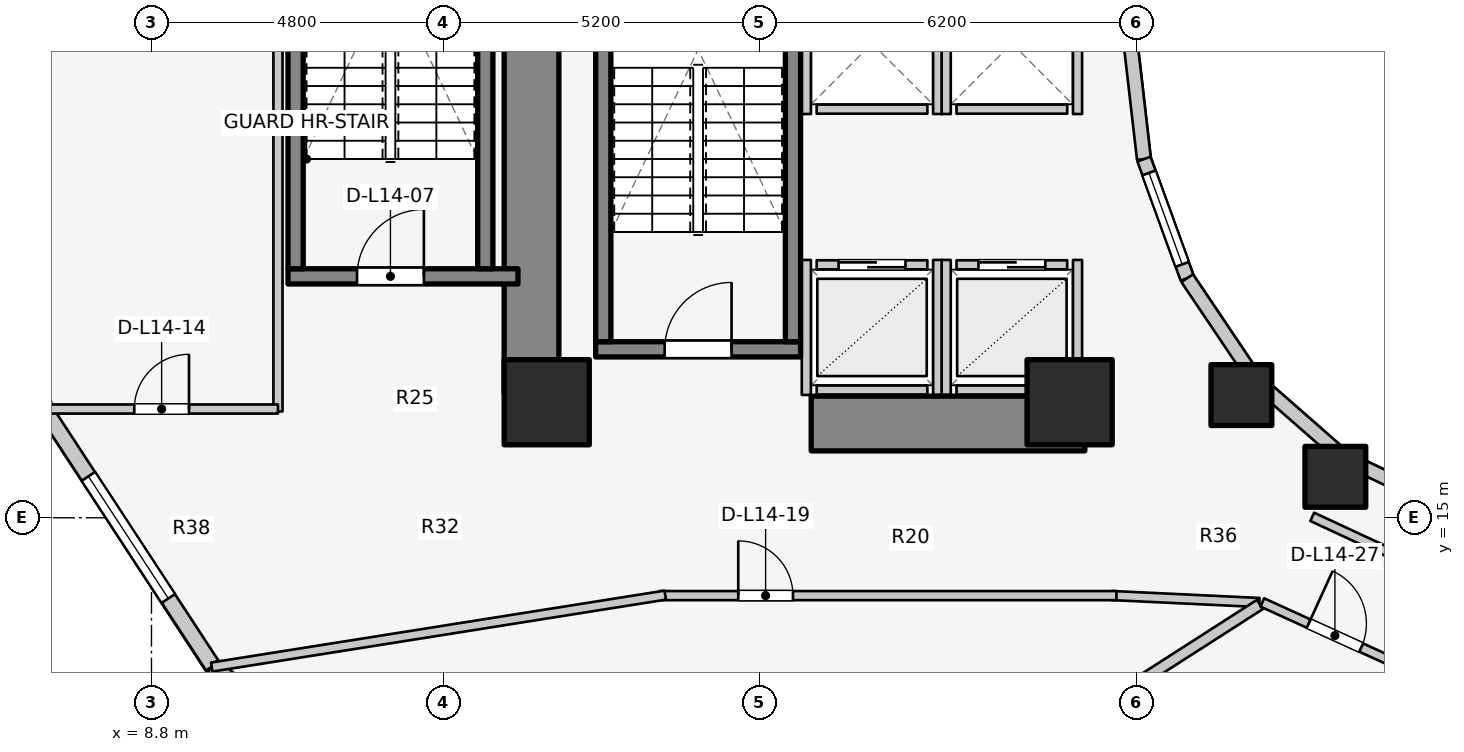
"""IFC4 building model, lengths in metres.
Left out: names, types, materials, properties, quantities, classifications, styles, units other than length and angle.
Written with IfcOpenShell. Run it as: python <this file> out.ifc"""

import sys

from ifc_helpers import new_model, si_unit, direction, frame, frame_2d, origin, origin_2d, place, context, subcontext, project, spatial, rectangle, extrude, element, fill, save


model = new_model("IFC4")
c1 = context("Model", 3, precision=1e-05, world=origin(), true_north=direction((0.0, 1.0)))
c2 = subcontext(c1, "Body", "Model", "MODEL_VIEW")
j1 = project(units=[si_unit("LENGTHUNIT", "METRE"), si_unit("PLANEANGLEUNIT", "RADIAN")], contexts=[c1])
p1 = place(None, origin())
s1 = spatial("IfcSite", under=j1, at=p1, CompositionType="ELEMENT")
p2 = place(p1, origin())
s2 = spatial("IfcBuilding", under=s1, at=p2, CompositionType="ELEMENT")
p3 = place(p2, frame((0.0, 0.0, 49.3)))
s3 = spatial("IfcBuildingStorey", under=s2, at=p3, CompositionType="ELEMENT", Elevation=49.3)
p4 = place(p3, frame((15.05, 17.05, 0.0), z_axis=(0.0, 0.0, 1.0), x_axis=(0.0, 1.0, 0.0)))
e1 = element("IfcWall", 1, at=p4, inside=s3, PredefinedType="SHEAR", context=c2, shape_type="SweptSolid", body=[
    extrude(rectangle(XDim=12.8, YDim=0.9, at=frame_2d((6.4, 0.0))), origin(), (0.0, 0.0, 1.0), 3.1),
])
p5 = place(p3, frame((19.65, 16.55, 0.0), z_axis=(0.0, 0.0, 1.0), x_axis=(1.0, 0.0, 0.0)))
e2 = element("IfcWall", 2, at=p5, inside=s3, PredefinedType="SHEAR", context=c2, shape_type="SweptSolid", body=[
    extrude(rectangle(XDim=4.5, YDim=0.9, at=frame_2d((2.25, 0.0))), origin(), (0.0, 0.0, 1.0), 3.1),
])
p6 = place(p3, frame((16.105, 17.77, 0.0), z_axis=(0.0, 0.0, 1.0), x_axis=(1.0, 0.0, 0.0)))
e3 = element("IfcWall", 3, at=p6, inside=s3, PredefinedType="SOLIDWALL", context=c2, shape_type="SweptSolid", body=[
    extrude(rectangle(XDim=3.37, YDim=0.25, at=frame_2d((1.685, 0.0))), origin(), (0.0, 0.0, 1.0), 3.1),
])
p7 = place(p6, frame((1.135, 0.0, 0.0)))
e4 = element("IfcOpeningElement", 4, at=p7, cuts=e3, PredefinedType="OPENING", context=c2, shape_type="SweptSolid", body=[
    extrude(rectangle(XDim=1.1, YDim=2.1, at=frame_2d((0.55, 1.05))), frame((0.0, 0.135, 0.0), z_axis=(0.0, -1.0, 0.0), x_axis=(1.0, 0.0, 0.0)), (0.0, 0.0, 1.0), 0.27),
])
for number, where, z_axis, x_axis in (
    (5, (16.23, 17.895, 0.0), (0.0, 0.0, 1.0), (0.0, 1.0, 0.0)),
    (6, (19.35, 17.895, 0.0), (0.0, 0.0, 1.0), (0.0, 1.0, 0.0)),
):
    element("IfcWall", number, at=place(p3, frame(where, z_axis=z_axis, x_axis=x_axis)), inside=s3, PredefinedType="SOLIDWALL", context=c2, shape_type="SweptSolid", body=[
        extrude(rectangle(XDim=7.81, YDim=0.25, at=frame_2d((3.905, 0.0))), origin(), (0.0, 0.0, 1.0), 3.1),
    ])
p8 = place(p3, frame((11.045, 18.97, 0.0), z_axis=(0.0, 0.0, 1.0), x_axis=(1.0, 0.0, 0.0)))
e7 = element("IfcWall", 7, at=p8, inside=s3, PredefinedType="SOLIDWALL", context=c2, shape_type="SweptSolid", body=[
    extrude(rectangle(XDim=3.782, YDim=0.25, at=frame_2d((1.891, 0.0))), origin(), (0.0, 0.0, 1.0), 3.1),
])
p9 = place(p8, frame((1.135, 0.0, 0.0)))
e8 = element("IfcOpeningElement", 8, at=p9, cuts=e7, PredefinedType="OPENING", context=c2, shape_type="SweptSolid", body=[
    extrude(rectangle(XDim=1.1, YDim=2.1, at=frame_2d((0.55, 1.05))), frame((0.0, 0.135, 0.0), z_axis=(0.0, -1.0, 0.0), x_axis=(1.0, 0.0, 0.0)), (0.0, 0.0, 1.0), 0.27),
])
for number, where, z_axis, x_axis in (
    (9, (11.17, 19.095, 0.0), (0.0, 0.0, 1.0), (0.0, 1.0, 0.0)),
    (10, (14.29, 19.095, 0.0), (0.0, 0.0, 1.0), (0.0, 1.0, 0.0)),
):
    element("IfcWall", number, at=place(p3, frame(where, z_axis=z_axis, x_axis=x_axis)), inside=s3, PredefinedType="SOLIDWALL", context=c2, shape_type="SweptSolid", body=[
        extrude(rectangle(XDim=7.81, YDim=0.25, at=frame_2d((3.905, 0.0))), origin(), (0.0, 0.0, 1.0), 3.1),
    ])
for number, where, z_axis, x_axis in (
    (11, (15.3, 16.9, 0.0), (0.0, 0.0, 1.0), (1.0, 0.0, 0.0)),
    (12, (23.9, 16.9, 0.0), (0.0, 0.0, 1.0), (1.0, 0.0, 0.0)),
):
    element("IfcColumn", number, at=place(p3, frame(where, z_axis=z_axis, x_axis=x_axis)), inside=s3, PredefinedType="COLUMN", context=c2, shape_type="SweptSolid", body=[
        extrude(rectangle(XDim=1.4, YDim=1.4, at=origin_2d()), origin(), (0.0, 0.0, 1.0), 3.1),
    ])
for number, where, z_axis, x_axis in (
    (13, (26.725, 17.018, 0.0), (0.0, 0.0, 1.0), (1.0, 0.0, 0.0)),
    (14, (28.27, 15.673, 0.0), (0.0, 0.0, 1.0), (1.0, 0.0, 0.0)),
):
    element("IfcColumn", number, at=place(p3, frame(where, z_axis=z_axis, x_axis=x_axis)), inside=s3, PredefinedType="COLUMN", context=c2, shape_type="SweptSolid", body=[
        extrude(rectangle(XDim=1.0, YDim=1.0, at=origin_2d()), origin(), (0.0, 0.0, 1.0), 3.1),
    ])
p10 = place(p3, frame((24.88, 23.0, 0.0), z_axis=(0.0, 0.0, 1.0), x_axis=(0.114711713601, -0.993398823617, 0.0)))
e15 = element("IfcWall", 15, at=p10, inside=s3, PredefinedType="STANDARD", context=c2, shape_type="SweptSolid", body=[
    extrude(rectangle(XDim=2.115, YDim=0.23, at=frame_2d((1.058, 0.0))), origin(), (0.0, 0.0, 1.0), 2.84),
])
p11 = place(p3, frame((25.123, 20.898, 0.0), z_axis=(0.0, 0.0, 1.0), x_axis=(0.341423187295, -0.93990968033, 0.0)))
e16 = element("IfcWall", 16, at=p11, inside=s3, PredefinedType="STANDARD", context=c2, shape_type="SweptSolid", body=[
    extrude(rectangle(XDim=2.084, YDim=0.23, at=frame_2d((1.042, 0.0))), origin(), (0.0, 0.0, 1.0), 2.84),
])
p12 = place(p11, frame((0.242, 0.0, 0.85)))
e17 = element("IfcOpeningElement", 17, at=p12, cuts=e16, PredefinedType="OPENING", context=c2, shape_type="SweptSolid", body=[
    extrude(rectangle(XDim=1.6, YDim=1.65, at=frame_2d((0.8, 0.825))), frame((0.0, 0.125, 0.0), z_axis=(0.0, -1.0, 0.0), x_axis=(1.0, 0.0, 0.0)), (0.0, 0.0, 1.0), 0.25),
])
p13 = place(p3, frame((25.834, 18.94, 0.0), z_axis=(0.0, 0.0, 1.0), x_axis=(0.558197800898, -0.829707909492, 0.0)))
e18 = element("IfcWall", 18, at=p13, inside=s3, PredefinedType="STANDARD", context=c2, shape_type="SweptSolid", body=[
    extrude(rectangle(XDim=2.027, YDim=0.23, at=frame_2d((1.013, 0.0))), origin(), (0.0, 0.0, 1.0), 2.16),
])
p14 = place(p3, frame((26.965, 17.258, 0.0), z_axis=(0.0, 0.0, 1.0), x_axis=(0.752576694707, -0.658504607869, 0.0)))
e19 = element("IfcWall", 19, at=p14, inside=s3, PredefinedType="STANDARD", context=c2, shape_type="SweptSolid", body=[
    extrude(rectangle(XDim=1.959, YDim=0.23, at=frame_2d((0.98, 0.0))), origin(), (0.0, 0.0, 1.0), 2.16),
])
p15 = place(p3, frame((28.44, 15.968, 0.0), z_axis=(0.0, 0.0, 1.0), x_axis=(0.904179699603, -0.427152280606, 0.0)))
e20 = element("IfcWall", 20, at=p15, inside=s3, PredefinedType="STANDARD", context=c2, shape_type="SweptSolid", body=[
    extrude(rectangle(XDim=1.899, YDim=0.23, at=frame_2d((0.95, 0.0))), origin(), (0.0, 0.0, 1.0), 2.16),
])
p16 = place(p3, frame((7.033, 16.795, 0.0), z_axis=(0.0, 0.0, 1.0), x_axis=(0.547702757047, -0.836672988642, 0.0)))
e21 = element("IfcWall", 21, at=p16, inside=s3, PredefinedType="STANDARD", context=c2, shape_type="SweptSolid", body=[
    extrude(rectangle(XDim=5.062, YDim=0.26, at=frame_2d((2.531, 0.0))), origin(), (0.0, 0.0, 1.0), 2.85),
])
p17 = place(p16, frame((1.331, 0.0, 0.75)))
e22 = element("IfcOpeningElement", 22, at=p17, cuts=e21, PredefinedType="OPENING", context=c2, shape_type="SweptSolid", body=[
    extrude(rectangle(XDim=2.4, YDim=1.7, at=frame_2d((1.2, 0.85))), frame((0.0, 0.14, 0.0), z_axis=(0.0, -1.0, 0.0), x_axis=(1.0, 0.0, 0.0)), (0.0, 0.0, 1.0), 0.28),
])
p18 = place(p3, frame((9.806, 12.559, 0.0), z_axis=(0.0, 0.0, 1.0), x_axis=(0.783123133379, -0.621866672179, 0.0)))
e23 = element("IfcWall", 23, at=p18, inside=s3, PredefinedType="STANDARD", context=c2, shape_type="SweptSolid", body=[
    extrude(rectangle(XDim=4.839, YDim=0.26, at=frame_2d((2.419, 0.0))), origin(), (0.0, 0.0, 1.0), 2.85),
])
p19 = place(p18, frame((1.669, 0.0, 0.75)))
e24 = element("IfcOpeningElement", 24, at=p19, cuts=e23, PredefinedType="OPENING", context=c2, shape_type="SweptSolid", body=[
    extrude(rectangle(XDim=1.5, YDim=1.6, at=frame_2d((0.75, 0.8))), frame((0.0, 0.14, 0.0), z_axis=(0.0, -1.0, 0.0), x_axis=(1.0, 0.0, 0.0)), (0.0, 0.0, 1.0), 0.28),
])
p20 = place(p3, frame((19.74, 19.16, 0.0), z_axis=(0.0, 0.0, 1.0), x_axis=(1.0, 0.0, 0.0)))
e25 = element("IfcWall", 25, at=p20, inside=s3, PredefinedType="SOLIDWALL", context=c2, shape_type="SweptSolid", body=[
    extrude(rectangle(XDim=1.82, YDim=0.15, at=frame_2d((0.91, 0.0))), origin(), (0.0, 0.0, 1.0), 2.855),
])
p21 = place(p20, frame((0.36, 0.0, 0.0)))
e26 = element("IfcOpeningElement", 26, at=p21, cuts=e25, PredefinedType="OPENING", context=c2, shape_type="SweptSolid", body=[
    extrude(rectangle(XDim=1.1, YDim=2.1, at=frame_2d((0.55, 1.05))), frame((0.0, 0.085, 0.0), z_axis=(0.0, -1.0, 0.0), x_axis=(1.0, 0.0, 0.0)), (0.0, 0.0, 1.0), 0.17),
])
p22 = place(p3, frame((19.74, 17.1, 0.0), z_axis=(0.0, 0.0, 1.0), x_axis=(1.0, 0.0, 0.0)))
e27 = element("IfcWall", 27, at=p22, inside=s3, PredefinedType="SOLIDWALL", context=c2, shape_type="SweptSolid", body=[
    extrude(rectangle(XDim=1.82, YDim=0.15, at=frame_2d((0.91, 0.0))), origin(), (0.0, 0.0, 1.0), 2.855),
])
p23 = place(p3, frame((19.57, 17.02, 0.0), z_axis=(0.0, 0.0, 1.0), x_axis=(0.0, 1.0, 0.0)))
e28 = element("IfcWall", 28, at=p23, inside=s3, PredefinedType="SOLIDWALL", context=c2, shape_type="SweptSolid", body=[
    extrude(rectangle(XDim=2.22, YDim=0.15, at=frame_2d((1.11, 0.0))), origin(), (0.0, 0.0, 1.0), 2.12),
])
p24 = place(p3, frame((21.73, 17.02, 0.0), z_axis=(0.0, 0.0, 1.0), x_axis=(0.0, 1.0, 0.0)))
e29 = element("IfcWall", 29, at=p24, inside=s3, PredefinedType="SOLIDWALL", context=c2, shape_type="SweptSolid", body=[
    extrude(rectangle(XDim=2.22, YDim=0.15, at=frame_2d((1.11, 0.0))), origin(), (0.0, 0.0, 1.0), 2.855),
])
p25 = place(p3, frame((22.04, 19.16, 0.0), z_axis=(0.0, 0.0, 1.0), x_axis=(1.0, 0.0, 0.0)))
e30 = element("IfcWall", 30, at=p25, inside=s3, PredefinedType="SOLIDWALL", context=c2, shape_type="SweptSolid", body=[
    extrude(rectangle(XDim=1.82, YDim=0.15, at=frame_2d((0.91, 0.0))), origin(), (0.0, 0.0, 1.0), 2.12),
])
p26 = place(p25, frame((0.36, 0.0, 0.0)))
e31 = element("IfcOpeningElement", 31, at=p26, cuts=e30, PredefinedType="OPENING", context=c2, shape_type="SweptSolid", body=[
    extrude(rectangle(XDim=1.1, YDim=2.1, at=frame_2d((0.55, 1.05))), frame((0.0, 0.085, 0.0), z_axis=(0.0, -1.0, 0.0), x_axis=(1.0, 0.0, 0.0)), (0.0, 0.0, 1.0), 0.17),
])
p27 = place(p3, frame((22.04, 17.1, 0.0), z_axis=(0.0, 0.0, 1.0), x_axis=(1.0, 0.0, 0.0)))
e32 = element("IfcWall", 32, at=p27, inside=s3, PredefinedType="SOLIDWALL", context=c2, shape_type="SweptSolid", body=[
    extrude(rectangle(XDim=1.82, YDim=0.15, at=frame_2d((0.91, 0.0))), origin(), (0.0, 0.0, 1.0), 2.12),
])
p28 = place(p3, frame((21.87, 17.02, 0.0), z_axis=(0.0, 0.0, 1.0), x_axis=(0.0, 1.0, 0.0)))
e33 = element("IfcWall", 33, at=p28, inside=s3, PredefinedType="SOLIDWALL", context=c2, shape_type="SweptSolid", body=[
    extrude(rectangle(XDim=2.22, YDim=0.15, at=frame_2d((1.11, 0.0))), origin(), (0.0, 0.0, 1.0), 2.855),
])
p29 = place(p3, frame((24.03, 17.02, 0.0), z_axis=(0.0, 0.0, 1.0), x_axis=(0.0, 1.0, 0.0)))
e34 = element("IfcWall", 34, at=p29, inside=s3, PredefinedType="SOLIDWALL", context=c2, shape_type="SweptSolid", body=[
    extrude(rectangle(XDim=2.22, YDim=0.15, at=frame_2d((1.11, 0.0))), origin(), (0.0, 0.0, 1.0), 2.12),
])
p30 = place(p3, frame((19.74, 21.72, 0.0), z_axis=(0.0, 0.0, 1.0), x_axis=(1.0, 0.0, 0.0)))
e35 = element("IfcWall", 35, at=p30, inside=s3, PredefinedType="SOLIDWALL", context=c2, shape_type="SweptSolid", body=[
    extrude(rectangle(XDim=1.82, YDim=0.15, at=frame_2d((0.91, 0.0))), origin(), (0.0, 0.0, 1.0), 2.855),
])
for number, where, z_axis, x_axis in (
    (36, (19.57, 21.64, 0.0), (0.0, 0.0, 1.0), (0.0, 1.0, 0.0)),
    (37, (21.73, 21.64, 0.0), (0.0, 0.0, 1.0), (0.0, 1.0, 0.0)),
):
    element("IfcWall", number, at=place(p3, frame(where, z_axis=z_axis, x_axis=x_axis)), inside=s3, PredefinedType="SOLIDWALL", context=c2, shape_type="SweptSolid", body=[
        extrude(rectangle(XDim=2.32, YDim=0.15, at=frame_2d((1.16, 0.0))), origin(), (0.0, 0.0, 1.0), 2.855),
    ])
p31 = place(p3, frame((22.04, 21.72, 0.0), z_axis=(0.0, 0.0, 1.0), x_axis=(1.0, 0.0, 0.0)))
e38 = element("IfcWall", 38, at=p31, inside=s3, PredefinedType="SOLIDWALL", context=c2, shape_type="SweptSolid", body=[
    extrude(rectangle(XDim=1.82, YDim=0.15, at=frame_2d((0.91, 0.0))), origin(), (0.0, 0.0, 1.0), 2.12),
])
p32 = place(p3, frame((21.87, 21.64, 0.0), z_axis=(0.0, 0.0, 1.0), x_axis=(0.0, 1.0, 0.0)))
e39 = element("IfcWall", 39, at=p32, inside=s3, PredefinedType="SOLIDWALL", context=c2, shape_type="SweptSolid", body=[
    extrude(rectangle(XDim=2.32, YDim=0.15, at=frame_2d((1.16, 0.0))), origin(), (0.0, 0.0, 1.0), 2.855),
])
p33 = place(p3, frame((24.03, 21.64, 0.0), z_axis=(0.0, 0.0, 1.0), x_axis=(0.0, 1.0, 0.0)))
e40 = element("IfcWall", 40, at=p33, inside=s3, PredefinedType="SOLIDWALL", context=c2, shape_type="SweptSolid", body=[
    extrude(rectangle(XDim=2.32, YDim=0.15, at=frame_2d((1.16, 0.0))), origin(), (0.0, 0.0, 1.0), 2.12),
])
p34 = place(p3, frame((27.89, 15.015, 0.0), z_axis=(0.0, 0.0, 1.0), x_axis=(0.906943449489, -0.421252393975, 0.0)))
e41 = element("IfcWall", 41, at=p34, inside=s3, PredefinedType="PARTITIONING", context=c2, shape_type="SweptSolid", body=[
    extrude(rectangle(XDim=2.186, YDim=0.15, at=frame_2d((1.093, 0.0))), origin(), (0.0, 0.0, 1.0), 2.237),
])
p35 = place(p3, frame((10.88, 16.748, 0.0), z_axis=(0.0, 0.0, 1.0), x_axis=(0.0, 1.0, 0.0)))
e42 = element("IfcWall", 42, at=p35, inside=s3, PredefinedType="PARTITIONING", context=c2, shape_type="SweptSolid", body=[
    extrude(rectangle(XDim=12.503, YDim=0.15, at=frame_2d((6.252, 0.0))), origin(), (0.0, 0.0, 1.0), 2.12),
])
p36 = place(p3, frame((7.014, 16.788, 0.0), z_axis=(0.0, 0.0, 1.0), x_axis=(1.0, 0.0, 0.0)))
e43 = element("IfcWall", 43, at=p36, inside=s3, PredefinedType="PARTITIONING", context=c2, shape_type="SweptSolid", body=[
    extrude(rectangle(XDim=3.866, YDim=0.15, at=frame_2d((1.933, 0.0))), origin(), (0.0, 0.0, 1.0), 2.855),
])
p37 = place(p36, frame((1.503, 0.0, 0.0)))
e44 = element("IfcOpeningElement", 44, at=p37, cuts=e43, PredefinedType="OPENING", context=c2, shape_type="SweptSolid", body=[
    extrude(rectangle(XDim=0.9, YDim=2.1, at=frame_2d((0.45, 1.05))), frame((0.0, 0.085, 0.0), z_axis=(0.0, -1.0, 0.0), x_axis=(1.0, 0.0, 0.0)), (0.0, 0.0, 1.0), 0.17),
])
p38 = place(p3, frame((27.02, 13.606, 0.0), z_axis=(0.0, 0.0, 1.0), x_axis=(-0.998877427952, 0.047369651964, 0.0)))
e45 = element("IfcWall", 45, at=p38, inside=s3, PredefinedType="PARTITIONING", context=c2, shape_type="SweptSolid", body=[
    extrude(rectangle(XDim=2.433, YDim=0.15, at=frame_2d((1.216, 0.0))), origin(), (0.0, 0.0, 1.0), 2.237),
])
p39 = place(p3, frame((17.15, 13.72, 0.0), z_axis=(0.0, 0.0, 1.0), x_axis=(1.0, 0.0, 0.0)))
e46 = element("IfcWall", 46, at=p39, inside=s3, PredefinedType="PARTITIONING", context=c2, shape_type="SweptSolid", body=[
    extrude(rectangle(XDim=7.52, YDim=0.15, at=frame_2d((3.76, 0.0))), origin(), (0.0, 0.0, 1.0), 2.237),
])
p40 = place(p39, frame((1.3, 0.0, 0.0)))
e47 = element("IfcOpeningElement", 47, at=p40, cuts=e46, PredefinedType="OPENING", context=c2, shape_type="SweptSolid", body=[
    extrude(rectangle(XDim=0.9, YDim=2.1, at=frame_2d((0.45, 1.05))), frame((0.0, 0.085, 0.0), z_axis=(0.0, -1.0, 0.0), x_axis=(1.0, 0.0, 0.0)), (0.0, 0.0, 1.0), 0.17),
])
p41 = place(p3, frame((17.25, 13.728, 0.0), z_axis=(0.0, 0.0, 1.0), x_axis=(-0.987655781226, -0.156639898525, 0.0)))
e48 = element("IfcWall", 48, at=p41, inside=s3, PredefinedType="PARTITIONING", context=c2, shape_type="SweptSolid", body=[
    extrude(rectangle(XDim=7.552, YDim=0.15, at=frame_2d((3.776, 0.0))), origin(), (0.0, 0.0, 1.0), 2.069),
])
p42 = place(p3, frame((27.029, 13.574, 0.0), z_axis=(0.0, 0.0, 1.0), x_axis=(-0.841689919529, -0.5399611832, 0.0)))
e49 = element("IfcWall", 49, at=p42, inside=s3, PredefinedType="PARTITIONING", context=c2, shape_type="SweptSolid", body=[
    extrude(rectangle(XDim=10.058, YDim=0.18, at=frame_2d((5.029, 0.0))), origin(), (0.0, 0.0, 1.0), 2.237),
])
p43 = place(p3, frame((29.414, 12.479, 0.0), z_axis=(0.0, 0.0, 1.0), x_axis=(-0.675465011224, -0.737392038615, 0.0)))
e50 = element("IfcWall", 50, at=p43, inside=s3, PredefinedType="PARTITIONING", context=c2, shape_type="SweptSolid", body=[
    extrude(rectangle(XDim=8.007, YDim=0.18, at=frame_2d((4.003, 0.0))), origin(), (0.0, 0.0, 1.0), 2.237),
])
p44 = place(p3, frame((27.069, 13.607, 0.0), z_axis=(0.0, 0.0, 1.0), x_axis=(0.909747571199, -0.415161843982, 0.0)))
e51 = element("IfcWall", 51, at=p44, inside=s3, PredefinedType="PARTITIONING", context=c2, shape_type="SweptSolid", body=[
    extrude(rectangle(XDim=2.625, YDim=0.15, at=frame_2d((1.312, 0.0))), origin(), (0.0, 0.0, 1.0), 2.237),
])
p45 = place(p44, frame((0.838, 0.0, 0.0)))
e52 = element("IfcOpeningElement", 52, at=p45, cuts=e51, PredefinedType="OPENING", context=c2, shape_type="SweptSolid", body=[
    extrude(rectangle(XDim=0.95, YDim=2.1, at=frame_2d((0.475, 1.05))), frame((0.0, 0.085, 0.0), z_axis=(0.0, -1.0, 0.0), x_axis=(1.0, 0.0, 0.0)), (0.0, 0.0, 1.0), 0.17),
])
p46 = place(p12, origin())
e53 = element("IfcWindow", 53, at=p46, inside=s3, PartitioningType="SINGLE_PANEL", PredefinedType="WINDOW", context=c2, shape_type="SweptSolid", body=[
    extrude(rectangle(XDim=1.6, YDim=1.65, at=frame_2d((0.8, 0.825))), frame((0.0, 0.03, 0.0), z_axis=(0.0, -1.0, 0.0), x_axis=(1.0, 0.0, 0.0)), (0.0, 0.0, 1.0), 0.06),
])
fill(e17, e53)
p47 = place(p17, origin())
e54 = element("IfcWindow", 54, at=p47, inside=s3, PartitioningType="SINGLE_PANEL", PredefinedType="WINDOW", context=c2, shape_type="SweptSolid", body=[
    extrude(rectangle(XDim=2.4, YDim=1.7, at=frame_2d((1.2, 0.85))), frame((0.0, 0.03, 0.0), z_axis=(0.0, -1.0, 0.0), x_axis=(1.0, 0.0, 0.0)), (0.0, 0.0, 1.0), 0.06),
])
fill(e22, e54)
p48 = place(p7, origin())
e55 = element("IfcDoor", 55, at=p48, inside=s3, OperationType="SINGLE_SWING_RIGHT", PredefinedType="DOOR", context=c2, shape_type="SweptSolid", body=[
    extrude(rectangle(XDim=1.1, YDim=2.1, at=frame_2d((0.55, 1.05))), frame((0.0, 0.025, 0.0), z_axis=(0.0, -1.0, 0.0), x_axis=(1.0, 0.0, 0.0)), (0.0, 0.0, 1.0), 0.05),
])
fill(e4, e55)
p49 = place(p9, origin())
e56 = element("IfcDoor", 56, at=p49, inside=s3, OperationType="SINGLE_SWING_RIGHT", PredefinedType="DOOR", context=c2, shape_type="SweptSolid", body=[
    extrude(rectangle(XDim=1.1, YDim=2.1, at=frame_2d((0.55, 1.05))), frame((0.0, 0.025, 0.0), z_axis=(0.0, -1.0, 0.0), x_axis=(1.0, 0.0, 0.0)), (0.0, 0.0, 1.0), 0.05),
])
fill(e8, e56)
p50 = place(p21, origin())
e57 = element("IfcDoor", 57, at=p50, inside=s3, OperationType="DOUBLE_DOOR_SLIDING", PredefinedType="DOOR", context=c2, shape_type="SweptSolid", body=[
    extrude(rectangle(XDim=1.1, YDim=2.1, at=frame_2d((0.55, 1.05))), frame((0.0, 0.025, 0.0), z_axis=(0.0, -1.0, 0.0), x_axis=(1.0, 0.0, 0.0)), (0.0, 0.0, 1.0), 0.05),
])
fill(e26, e57)
p51 = place(p26, origin())
e58 = element("IfcDoor", 58, at=p51, inside=s3, OperationType="DOUBLE_DOOR_SLIDING", PredefinedType="DOOR", context=c2, shape_type="SweptSolid", body=[
    extrude(rectangle(XDim=1.1, YDim=2.1, at=frame_2d((0.55, 1.05))), frame((0.0, 0.025, 0.0), z_axis=(0.0, -1.0, 0.0), x_axis=(1.0, 0.0, 0.0)), (0.0, 0.0, 1.0), 0.05),
])
fill(e31, e58)
p52 = place(p37, origin())
e59 = element("IfcDoor", 59, at=p52, inside=s3, OperationType="SINGLE_SWING_RIGHT", PredefinedType="DOOR", context=c2, shape_type="SweptSolid", body=[
    extrude(rectangle(XDim=0.9, YDim=2.1, at=frame_2d((0.45, 1.05))), frame((0.0, 0.025, 0.0), z_axis=(0.0, -1.0, 0.0), x_axis=(1.0, 0.0, 0.0)), (0.0, 0.0, 1.0), 0.05),
])
fill(e44, e59)
p53 = place(p40, origin())
e60 = element("IfcDoor", 60, at=p53, inside=s3, OperationType="SINGLE_SWING_LEFT", PredefinedType="DOOR", context=c2, shape_type="SweptSolid", body=[
    extrude(rectangle(XDim=0.9, YDim=2.1, at=frame_2d((0.45, 1.05))), frame((0.0, 0.025, 0.0), z_axis=(0.0, -1.0, 0.0), x_axis=(1.0, 0.0, 0.0)), (0.0, 0.0, 1.0), 0.05),
])
fill(e47, e60)
p54 = place(p45, origin())
e61 = element("IfcDoor", 61, at=p54, inside=s3, OperationType="SINGLE_SWING_LEFT", PredefinedType="DOOR", context=c2, shape_type="SweptSolid", body=[
    extrude(rectangle(XDim=0.95, YDim=2.1, at=frame_2d((0.475, 1.05))), frame((0.0, 0.025, 0.0), z_axis=(0.0, -1.0, 0.0), x_axis=(1.0, 0.0, 0.0)), (0.0, 0.0, 1.0), 0.05),
])
fill(e52, e61)
save(model, sys.argv[1])
